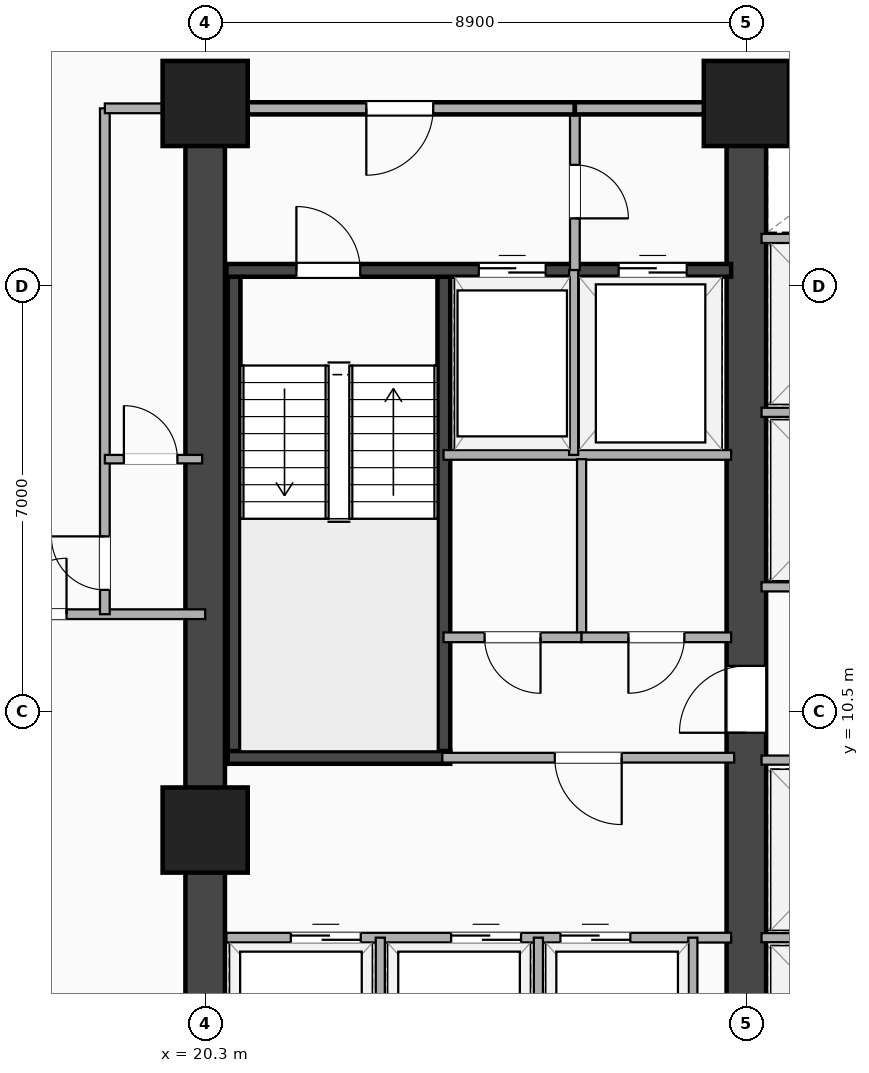
"""IFC4 building model, lengths in metres.
Left out: names, types, materials, properties, quantities, classifications, styles, units other than length and angle.
Written with IfcOpenShell. Run it as: python <this file> out.ifc"""

import sys

from ifc_helpers import new_model, si_unit, direction, frame, frame_2d, origin, origin_2d, place, context, subcontext, project, spatial, rectangle, extrude, element, fill, save


model = new_model("IFC4")
c1 = context("Model", 3, precision=1e-05, world=origin(), true_north=direction((0.0, 1.0)))
c2 = subcontext(c1, "Body", "Model", "MODEL_VIEW")
j1 = project(units=[si_unit("LENGTHUNIT", "METRE"), si_unit("PLANEANGLEUNIT", "RADIAN")], contexts=[c1])
p1 = place(None, origin())
s1 = spatial("IfcSite", under=j1, at=p1, CompositionType="ELEMENT")
p2 = place(p1, origin())
s2 = spatial("IfcBuilding", under=s1, at=p2, CompositionType="ELEMENT")
p3 = place(p2, frame((0.0, 0.0, 71.9)))
s3 = spatial("IfcBuildingStorey", under=s2, at=p3, CompositionType="ELEMENT", Elevation=71.9)
p4 = place(p3, frame((20.3, 3.5, 0.0), z_axis=(0.0, 0.0, 1.0), x_axis=(0.0, 1.0, 0.0)))
e1 = element("IfcWall", 1, at=p4, inside=s3, PredefinedType="SHEAR", context=c2, shape_type="SweptSolid", body=[
    extrude(rectangle(XDim=16.9, YDim=0.65, at=frame_2d((8.45, 0.0))), origin(), (0.0, 0.0, 1.0), 3.18),
])
p5 = place(p3, frame((29.2, 3.5, 0.0), z_axis=(0.0, 0.0, 1.0), x_axis=(0.0, 1.0, 0.0)))
e2 = element("IfcWall", 2, at=p5, inside=s3, PredefinedType="SHEAR", context=c2, shape_type="SweptSolid", body=[
    extrude(rectangle(XDim=16.9, YDim=0.65, at=frame_2d((8.45, 0.0))), origin(), (0.0, 0.0, 1.0), 3.18),
])
p6 = place(p5, frame((7.75, 0.0, 0.0), z_axis=(0.0, 0.0, 1.0), x_axis=(-1.0, 0.0, 0.0)))
e3 = element("IfcOpeningElement", 3, at=p6, cuts=e2, PredefinedType="OPENING", context=c2, shape_type="SweptSolid", body=[
    extrude(rectangle(XDim=1.1, YDim=2.15, at=frame_2d((0.55, 1.075))), frame((0.0, 0.335, 0.0), z_axis=(0.0, -1.0, 0.0), x_axis=(1.0, 0.0, 0.0)), (0.0, 0.0, 1.0), 0.67),
])
for number, where, z_axis, x_axis in (
    (4, (20.775, 9.745, 0.0), (0.0, 0.0, 1.0), (0.0, 1.0, 0.0)),
    (5, (24.225, 9.745, 0.0), (0.0, 0.0, 1.0), (0.0, 1.0, 0.0)),
):
    element("IfcWall", number, at=place(p3, frame(where, z_axis=z_axis, x_axis=x_axis)), inside=s3, PredefinedType="SHEAR", context=c2, shape_type="SweptSolid", body=[
        extrude(rectangle(XDim=8.01, YDim=0.21, at=frame_2d((4.005, 0.0))), origin(), (0.0, 0.0, 1.0), 3.18),
    ])
p7 = place(p3, frame((20.67, 9.745, 0.0), z_axis=(0.0, 0.0, 1.0), x_axis=(1.0, 0.0, 0.0)))
e6 = element("IfcWall", 6, at=p7, inside=s3, PredefinedType="SHEAR", context=c2, shape_type="SweptSolid", body=[
    extrude(rectangle(XDim=3.66, YDim=0.21, at=frame_2d((1.83, 0.0))), origin(), (0.0, 0.0, 1.0), 3.18),
])
p8 = place(p3, frame((20.65, 17.755, 0.0), z_axis=(0.0, 0.0, 1.0), x_axis=(1.0, 0.0, 0.0)))
e7 = element("IfcWall", 7, at=p8, inside=s3, PredefinedType="SHEAR", context=c2, shape_type="SweptSolid", body=[
    extrude(rectangle(XDim=8.3, YDim=0.21, at=frame_2d((4.15, 0.0))), origin(), (0.0, 0.0, 1.0), 3.18),
])
p9 = place(p8, frame((2.2, 0.0, 0.0), z_axis=(0.0, 0.0, 1.0), x_axis=(-1.0, 0.0, 0.0)))
e8 = element("IfcOpeningElement", 8, at=p9, cuts=e7, PredefinedType="OPENING", context=c2, shape_type="SweptSolid", body=[
    extrude(rectangle(XDim=1.05, YDim=2.15, at=frame_2d((0.525, 1.075))), frame((0.0, 0.115, 0.0), z_axis=(0.0, -1.0, 0.0), x_axis=(1.0, 0.0, 0.0)), (0.0, 0.0, 1.0), 0.23),
])
p10 = place(p8, frame((4.15, 0.0, 0.0)))
e9 = element("IfcOpeningElement", 9, at=p10, cuts=e7, PredefinedType="OPENING", context=c2, shape_type="SweptSolid", body=[
    extrude(rectangle(XDim=1.1, YDim=2.18, at=frame_2d((0.55, 1.09))), frame((0.0, 0.115, 0.0), z_axis=(0.0, -1.0, 0.0), x_axis=(1.0, 0.0, 0.0)), (0.0, 0.0, 1.0), 0.23),
])
p11 = place(p8, frame((6.45, 0.0, 0.0)))
e10 = element("IfcOpeningElement", 10, at=p11, cuts=e7, PredefinedType="OPENING", context=c2, shape_type="SweptSolid", body=[
    extrude(rectangle(XDim=1.12, YDim=2.2, at=frame_2d((0.56, 1.1))), frame((0.0, 0.115, 0.0), z_axis=(0.0, -1.0, 0.0), x_axis=(1.0, 0.0, 0.0)), (0.0, 0.0, 1.0), 0.23),
])
for number, where, z_axis, x_axis in (
    (11, (20.3, 8.55, -0.28), (0.0, 0.0, 1.0), (1.0, 0.0, 0.0)),
    (12, (20.3, 20.5, -0.28), (0.0, 0.0, 1.0), (1.0, 0.0, 0.0)),
    (13, (29.2, 20.5, -0.28), (0.0, 0.0, 1.0), (1.0, 0.0, 0.0)),
):
    element("IfcColumn", number, at=place(p3, frame(where, z_axis=z_axis, x_axis=x_axis)), inside=s3, PredefinedType="COLUMN", context=c2, shape_type="SweptSolid", body=[
        extrude(rectangle(XDim=1.4, YDim=1.4, at=origin_2d()), origin(), (0.0, 0.0, 1.0), 3.46),
    ])
p12 = place(p3, frame((26.38, 17.76, 0.0), z_axis=(0.0, 0.0, 1.0), x_axis=(0.0, 1.0, 0.0)))
e14 = element("IfcWall", 14, at=p12, inside=s3, PredefinedType="PARTITIONING", context=c2, shape_type="SweptSolid", body=[
    extrude(rectangle(XDim=2.66, YDim=0.16, at=frame_2d((1.33, 0.0))), origin(), (0.0, 0.0, 1.0), 2.47),
])
p13 = place(p12, frame((0.85, 0.0, 0.0)))
e15 = element("IfcOpeningElement", 15, at=p13, cuts=e14, PredefinedType="OPENING", context=c2, shape_type="SweptSolid", body=[
    extrude(rectangle(XDim=0.88, YDim=2.08, at=frame_2d((0.44, 1.04))), frame((0.0, 0.09, 0.0), z_axis=(0.0, -1.0, 0.0), x_axis=(1.0, 0.0, 0.0)), (0.0, 0.0, 1.0), 0.18),
])
p14 = place(p3, frame((24.22, 14.72, 0.0), z_axis=(0.0, 0.0, 1.0), x_axis=(1.0, 0.0, 0.0)))
e16 = element("IfcWall", 16, at=p14, inside=s3, PredefinedType="PARTITIONING", context=c2, shape_type="SweptSolid", body=[
    extrude(rectangle(XDim=4.73, YDim=0.16, at=frame_2d((2.365, 0.0))), origin(), (0.0, 0.0, 1.0), 3.18),
])
p15 = place(p3, frame((26.36, 14.72, 0.0), z_axis=(0.0, 0.0, 1.0), x_axis=(0.0, 1.0, 0.0)))
e17 = element("IfcWall", 17, at=p15, inside=s3, PredefinedType="PARTITIONING", context=c2, shape_type="SweptSolid", body=[
    extrude(rectangle(XDim=3.04, YDim=0.15, at=frame_2d((1.52, 0.0))), origin(), (0.0, 0.0, 1.0), 3.18),
])
p16 = place(p3, frame((20.65, 20.42, 0.0), z_axis=(0.0, 0.0, 1.0), x_axis=(1.0, 0.0, 0.0)))
e18 = element("IfcWall", 18, at=p16, inside=s3, PredefinedType="PARTITIONING", context=c2, shape_type="SweptSolid", body=[
    extrude(rectangle(XDim=5.73, YDim=0.2, at=frame_2d((2.865, 0.0))), origin(), (0.0, 0.0, 1.0), 2.47),
])
p17 = place(p16, frame((2.3, 0.0, 0.0)))
e19 = element("IfcOpeningElement", 19, at=p17, cuts=e18, PredefinedType="OPENING", context=c2, shape_type="SweptSolid", body=[
    extrude(rectangle(XDim=1.1, YDim=2.15, at=frame_2d((0.55, 1.075))), frame((0.0, 0.11, 0.0), z_axis=(0.0, -1.0, 0.0), x_axis=(1.0, 0.0, 0.0)), (0.0, 0.0, 1.0), 0.22),
])
p18 = place(p3, frame((26.38, 20.42, 0.0), z_axis=(0.0, 0.0, 1.0), x_axis=(1.0, 0.0, 0.0)))
e20 = element("IfcWall", 20, at=p18, inside=s3, PredefinedType="PARTITIONING", context=c2, shape_type="SweptSolid", body=[
    extrude(rectangle(XDim=2.82, YDim=0.2, at=frame_2d((1.41, 0.0))), origin(), (0.0, 0.0, 1.0), 2.47),
])
p19 = place(p3, frame((29.2, 20.42, 0.0), z_axis=(0.0, 0.0, 1.0), x_axis=(1.0, 0.0, 0.0)))
e21 = element("IfcWall", 21, at=p19, inside=s3, PredefinedType="PARTITIONING", context=c2, shape_type="SweptSolid", body=[
    extrude(rectangle(XDim=7.8, YDim=0.2, at=frame_2d((3.9, 0.0))), origin(), (0.0, 0.0, 1.0), 2.47),
])
p20 = place(p19, frame((3.55, 0.0, 0.0)))
e22 = element("IfcOpeningElement", 22, at=p20, cuts=e21, PredefinedType="OPENING", context=c2, shape_type="SweptSolid", body=[
    extrude(rectangle(XDim=1.1, YDim=2.15, at=frame_2d((0.55, 1.075))), frame((0.0, 0.11, 0.0), z_axis=(0.0, -1.0, 0.0), x_axis=(1.0, 0.0, 0.0)), (0.0, 0.0, 1.0), 0.22),
])
p21 = place(p3, frame((26.49, 11.72, 0.0), z_axis=(0.0, 0.0, 1.0), x_axis=(0.0, 1.0, 0.0)))
e23 = element("IfcWall", 23, at=p21, inside=s3, PredefinedType="PARTITIONING", context=c2, shape_type="SweptSolid", body=[
    extrude(rectangle(XDim=2.93, YDim=0.15, at=frame_2d((1.465, 0.0))), origin(), (0.0, 0.0, 1.0), 3.18),
])
p22 = place(p3, frame((24.22, 11.72, 0.0), z_axis=(0.0, 0.0, 1.0), x_axis=(1.0, 0.0, 0.0)))
e24 = element("IfcWall", 24, at=p22, inside=s3, PredefinedType="PARTITIONING", context=c2, shape_type="SweptSolid", body=[
    extrude(rectangle(XDim=2.271, YDim=0.16, at=frame_2d((1.135, 0.0))), origin(), (0.0, 0.0, 1.0), 3.18),
])
p23 = place(p22, frame((0.675, 0.0, 0.0)))
e25 = element("IfcOpeningElement", 25, at=p23, cuts=e24, PredefinedType="OPENING", context=c2, shape_type="SweptSolid", body=[
    extrude(rectangle(XDim=0.92, YDim=2.08, at=frame_2d((0.46, 1.04))), frame((0.0, 0.09, 0.0), z_axis=(0.0, -1.0, 0.0), x_axis=(1.0, 0.0, 0.0)), (0.0, 0.0, 1.0), 0.18),
])
p24 = place(p3, frame((26.49, 11.72, 0.0), z_axis=(0.0, 0.0, 1.0), x_axis=(1.0, 0.0, 0.0)))
e26 = element("IfcWall", 26, at=p24, inside=s3, PredefinedType="PARTITIONING", context=c2, shape_type="SweptSolid", body=[
    extrude(rectangle(XDim=2.459, YDim=0.16, at=frame_2d((1.23, 0.0))), origin(), (0.0, 0.0, 1.0), 3.18),
])
p25 = place(p24, frame((0.77, 0.0, 0.0)))
e27 = element("IfcOpeningElement", 27, at=p25, cuts=e26, PredefinedType="OPENING", context=c2, shape_type="SweptSolid", body=[
    extrude(rectangle(XDim=0.92, YDim=2.08, at=frame_2d((0.46, 1.04))), frame((0.0, 0.09, 0.0), z_axis=(0.0, -1.0, 0.0), x_axis=(1.0, 0.0, 0.0)), (0.0, 0.0, 1.0), 0.18),
])
p26 = place(p3, frame((20.65, 6.78, 0.0), z_axis=(0.0, 0.0, 1.0), x_axis=(1.0, 0.0, 0.0)))
e28 = element("IfcWall", 28, at=p26, inside=s3, PredefinedType="PARTITIONING", context=c2, shape_type="SweptSolid", body=[
    extrude(rectangle(XDim=8.3, YDim=0.16, at=frame_2d((4.15, 0.0))), origin(), (0.0, 0.0, 1.0), 2.47),
])
p27 = place(p26, frame((3.695, 0.0, 0.0)))
e29 = element("IfcOpeningElement", 29, at=p27, cuts=e28, PredefinedType="OPENING", context=c2, shape_type="SweptSolid", body=[
    extrude(rectangle(XDim=1.15, YDim=2.2, at=frame_2d((0.575, 1.1))), frame((0.0, 0.09, 0.0), z_axis=(0.0, -1.0, 0.0), x_axis=(1.0, 0.0, 0.0)), (0.0, 0.0, 1.0), 0.18),
])
p28 = place(p26, frame((5.492, 0.0, 0.0)))
e30 = element("IfcOpeningElement", 30, at=p28, cuts=e28, PredefinedType="OPENING", context=c2, shape_type="SweptSolid", body=[
    extrude(rectangle(XDim=1.15, YDim=2.2, at=frame_2d((0.575, 1.1))), frame((0.0, 0.09, 0.0), z_axis=(0.0, -1.0, 0.0), x_axis=(1.0, 0.0, 0.0)), (0.0, 0.0, 1.0), 0.18),
])
p29 = place(p26, frame((1.059, 0.0, 0.0)))
e31 = element("IfcOpeningElement", 31, at=p29, cuts=e28, PredefinedType="OPENING", context=c2, shape_type="SweptSolid", body=[
    extrude(rectangle(XDim=1.15, YDim=2.2, at=frame_2d((0.575, 1.1))), frame((0.0, 0.09, 0.0), z_axis=(0.0, -1.0, 0.0), x_axis=(1.0, 0.0, 0.0)), (0.0, 0.0, 1.0), 0.18),
])
for number, where, z_axis, x_axis in (
    (32, (23.18, 3.9, 0.0), (0.0, 0.0, 1.0), (0.0, 1.0, 0.0)),
    (33, (25.78, 3.9, 0.0), (0.0, 0.0, 1.0), (0.0, 1.0, 0.0)),
    (34, (28.32, 3.9, 0.0), (0.0, 0.0, 1.0), (0.0, 1.0, 0.0)),
):
    element("IfcWall", number, at=place(p3, frame(where, z_axis=z_axis, x_axis=x_axis)), inside=s3, PredefinedType="PARTITIONING", context=c2, shape_type="SweptSolid", body=[
        extrude(rectangle(XDim=2.88, YDim=0.15, at=frame_2d((1.44, 0.0))), origin(), (0.0, 0.0, 1.0), 3.18),
    ])
p30 = place(p3, frame((24.2, 9.74, 0.0), z_axis=(0.0, 0.0, 1.0), x_axis=(1.0, 0.0, 0.0)))
e35 = element("IfcWall", 35, at=p30, inside=s3, PredefinedType="PARTITIONING", context=c2, shape_type="SweptSolid", body=[
    extrude(rectangle(XDim=4.8, YDim=0.16, at=frame_2d((2.4, 0.0))), origin(), (0.0, 0.0, 1.0), 3.18),
])
p31 = place(p30, frame((1.85, 0.0, 0.0)))
e36 = element("IfcOpeningElement", 36, at=p31, cuts=e35, PredefinedType="OPENING", context=c2, shape_type="SweptSolid", body=[
    extrude(rectangle(XDim=1.1, YDim=2.15, at=frame_2d((0.55, 1.075))), frame((0.0, 0.09, 0.0), z_axis=(0.0, -1.0, 0.0), x_axis=(1.0, 0.0, 0.0)), (0.0, 0.0, 1.0), 0.18),
])
for number, where, z_axis, x_axis in (
    (37, (29.45, 6.78, 0.0), (0.0, 0.0, 1.0), (1.0, 0.0, 0.0)),
    (38, (29.45, 9.7, 0.0), (0.0, 0.0, 1.0), (1.0, 0.0, 0.0)),
    (39, (29.45, 12.55, 0.0), (0.0, 0.0, 1.0), (1.0, 0.0, 0.0)),
    (40, (29.45, 15.42, 0.0), (0.0, 0.0, 1.0), (1.0, 0.0, 0.0)),
    (41, (29.45, 18.28, 0.0), (0.0, 0.0, 1.0), (1.0, 0.0, 0.0)),
):
    element("IfcWall", number, at=place(p3, frame(where, z_axis=z_axis, x_axis=x_axis)), inside=s3, PredefinedType="PARTITIONING", context=c2, shape_type="SweptSolid", body=[
        extrude(rectangle(XDim=2.77, YDim=0.15, at=frame_2d((1.385, 0.0))), origin(), (0.0, 0.0, 1.0), 3.18),
    ])
p32 = place(p3, frame((16.65, 12.1, 0.0), z_axis=(0.0, 0.0, 1.0), x_axis=(1.0, 0.0, 0.0)))
e42 = element("IfcWall", 42, at=p32, inside=s3, PredefinedType="PARTITIONING", context=c2, shape_type="SweptSolid", body=[
    extrude(rectangle(XDim=3.65, YDim=0.16, at=frame_2d((1.825, 0.0))), origin(), (0.0, 0.0, 1.0), 2.47),
])
p33 = place(p32, frame((1.37, 0.0, 0.0), z_axis=(0.0, 0.0, 1.0), x_axis=(-1.0, 0.0, 0.0)))
e43 = element("IfcOpeningElement", 43, at=p33, cuts=e42, PredefinedType="OPENING", context=c2, shape_type="SweptSolid", body=[
    extrude(rectangle(XDim=0.92, YDim=2.08, at=frame_2d((0.46, 1.04))), frame((0.0, 0.09, 0.0), z_axis=(0.0, -1.0, 0.0), x_axis=(1.0, 0.0, 0.0)), (0.0, 0.0, 1.0), 0.18),
])
p34 = place(p3, frame((18.65, 12.1, 0.0), z_axis=(0.0, 0.0, 1.0), x_axis=(0.0, 1.0, 0.0)))
e44 = element("IfcWall", 44, at=p34, inside=s3, PredefinedType="PARTITIONING", context=c2, shape_type="SweptSolid", body=[
    extrude(rectangle(XDim=8.32, YDim=0.16, at=frame_2d((4.16, 0.0))), origin(), (0.0, 0.0, 1.0), 2.47),
])
p35 = place(p34, frame((1.28, 0.0, 0.0), z_axis=(0.0, 0.0, 1.0), x_axis=(-1.0, 0.0, 0.0)))
e45 = element("IfcOpeningElement", 45, at=p35, cuts=e44, PredefinedType="OPENING", context=c2, shape_type="SweptSolid", body=[
    extrude(rectangle(XDim=0.88, YDim=2.08, at=frame_2d((0.44, 1.04))), frame((0.0, 0.09, 0.0), z_axis=(0.0, -1.0, 0.0), x_axis=(1.0, 0.0, 0.0)), (0.0, 0.0, 1.0), 0.18),
])
p36 = place(p3, frame((18.65, 20.42, 0.0), z_axis=(0.0, 0.0, 1.0), x_axis=(1.0, 0.0, 0.0)))
e46 = element("IfcWall", 46, at=p36, inside=s3, PredefinedType="PARTITIONING", context=c2, shape_type="SweptSolid", body=[
    extrude(rectangle(XDim=1.65, YDim=0.16, at=frame_2d((0.825, 0.0))), origin(), (0.0, 0.0, 1.0), 2.47),
])
p37 = place(p3, frame((18.65, 14.65, 0.0), z_axis=(0.0, 0.0, 1.0), x_axis=(1.0, 0.0, 0.0)))
e47 = element("IfcWall", 47, at=p37, inside=s3, PredefinedType="PARTITIONING", context=c2, shape_type="SweptSolid", body=[
    extrude(rectangle(XDim=1.6, YDim=0.14, at=frame_2d((0.8, 0.0))), origin(), (0.0, 0.0, 1.0), 2.47),
])
p38 = place(p37, frame((1.193, 0.0, 0.0), z_axis=(0.0, 0.0, 1.0), x_axis=(-1.0, 0.0, 0.0)))
e48 = element("IfcOpeningElement", 48, at=p38, cuts=e47, PredefinedType="OPENING", context=c2, shape_type="SweptSolid", body=[
    extrude(rectangle(XDim=0.88, YDim=2.08, at=frame_2d((0.44, 1.04))), frame((0.0, 0.08, 0.0), z_axis=(0.0, -1.0, 0.0), x_axis=(1.0, 0.0, 0.0)), (0.0, 0.0, 1.0), 0.16),
])
p39 = place(p9, origin())
e49 = element("IfcDoor", 49, at=p39, inside=s3, OperationType="SINGLE_SWING_LEFT", PredefinedType="DOOR", context=c2, shape_type="SweptSolid", body=[
    extrude(rectangle(XDim=1.05, YDim=2.15, at=frame_2d((0.525, 1.075))), frame((0.0, 0.025, 0.0), z_axis=(0.0, -1.0, 0.0), x_axis=(1.0, 0.0, 0.0)), (0.0, 0.0, 1.0), 0.05),
])
fill(e8, e49)
p40 = place(p10, origin())
e50 = element("IfcDoor", 50, at=p40, inside=s3, OperationType="DOUBLE_DOOR_SLIDING", PredefinedType="DOOR", context=c2, shape_type="SweptSolid", body=[
    extrude(rectangle(XDim=1.1, YDim=2.18, at=frame_2d((0.55, 1.09))), frame((0.0, 0.025, 0.0), z_axis=(0.0, -1.0, 0.0), x_axis=(1.0, 0.0, 0.0)), (0.0, 0.0, 1.0), 0.05),
])
fill(e9, e50)
p41 = place(p11, origin())
e51 = element("IfcDoor", 51, at=p41, inside=s3, OperationType="DOUBLE_DOOR_SLIDING", PredefinedType="DOOR", context=c2, shape_type="SweptSolid", body=[
    extrude(rectangle(XDim=1.12, YDim=2.2, at=frame_2d((0.56, 1.1))), frame((0.0, 0.025, 0.0), z_axis=(0.0, -1.0, 0.0), x_axis=(1.0, 0.0, 0.0)), (0.0, 0.0, 1.0), 0.05),
])
fill(e10, e51)
p42 = place(p6, origin())
e52 = element("IfcDoor", 52, at=p42, inside=s3, OperationType="SINGLE_SWING_LEFT", PredefinedType="DOOR", context=c2, shape_type="SweptSolid", body=[
    extrude(rectangle(XDim=1.1, YDim=2.15, at=frame_2d((0.55, 1.075))), frame((0.0, 0.025, 0.0), z_axis=(0.0, -1.0, 0.0), x_axis=(1.0, 0.0, 0.0)), (0.0, 0.0, 1.0), 0.05),
])
fill(e3, e52)
p43 = place(p13, origin())
e53 = element("IfcDoor", 53, at=p43, inside=s3, OperationType="SINGLE_SWING_LEFT", PredefinedType="DOOR", context=c2, shape_type="SweptSolid", body=[
    extrude(rectangle(XDim=0.88, YDim=2.08, at=frame_2d((0.44, 1.04))), frame((0.0, 0.025, 0.0), z_axis=(0.0, -1.0, 0.0), x_axis=(1.0, 0.0, 0.0)), (0.0, 0.0, 1.0), 0.05),
])
fill(e15, e53)
p44 = place(p17, origin())
e54 = element("IfcDoor", 54, at=p44, inside=s3, OperationType="SINGLE_SWING_LEFT", PredefinedType="DOOR", context=c2, shape_type="SweptSolid", body=[
    extrude(rectangle(XDim=1.1, YDim=2.15, at=frame_2d((0.55, 1.075))), frame((0.0, 0.025, 0.0), z_axis=(0.0, -1.0, 0.0), x_axis=(1.0, 0.0, 0.0)), (0.0, 0.0, 1.0), 0.05),
])
fill(e19, e54)
p45 = place(p23, origin())
e55 = element("IfcDoor", 55, at=p45, inside=s3, OperationType="SINGLE_SWING_RIGHT", PredefinedType="DOOR", context=c2, shape_type="SweptSolid", body=[
    extrude(rectangle(XDim=0.92, YDim=2.08, at=frame_2d((0.46, 1.04))), frame((0.0, 0.025, 0.0), z_axis=(0.0, -1.0, 0.0), x_axis=(1.0, 0.0, 0.0)), (0.0, 0.0, 1.0), 0.05),
])
fill(e25, e55)
p46 = place(p25, origin())
e56 = element("IfcDoor", 56, at=p46, inside=s3, OperationType="SINGLE_SWING_LEFT", PredefinedType="DOOR", context=c2, shape_type="SweptSolid", body=[
    extrude(rectangle(XDim=0.92, YDim=2.08, at=frame_2d((0.46, 1.04))), frame((0.0, 0.025, 0.0), z_axis=(0.0, -1.0, 0.0), x_axis=(1.0, 0.0, 0.0)), (0.0, 0.0, 1.0), 0.05),
])
fill(e27, e56)
p47 = place(p27, origin())
e57 = element("IfcDoor", 57, at=p47, inside=s3, OperationType="DOUBLE_DOOR_SLIDING", PredefinedType="DOOR", context=c2, shape_type="SweptSolid", body=[
    extrude(rectangle(XDim=1.15, YDim=2.2, at=frame_2d((0.575, 1.1))), frame((0.0, 0.025, 0.0), z_axis=(0.0, -1.0, 0.0), x_axis=(1.0, 0.0, 0.0)), (0.0, 0.0, 1.0), 0.05),
])
fill(e29, e57)
p48 = place(p28, origin())
e58 = element("IfcDoor", 58, at=p48, inside=s3, OperationType="DOUBLE_DOOR_SLIDING", PredefinedType="DOOR", context=c2, shape_type="SweptSolid", body=[
    extrude(rectangle(XDim=1.15, YDim=2.2, at=frame_2d((0.575, 1.1))), frame((0.0, 0.025, 0.0), z_axis=(0.0, -1.0, 0.0), x_axis=(1.0, 0.0, 0.0)), (0.0, 0.0, 1.0), 0.05),
])
fill(e30, e58)
p49 = place(p29, origin())
e59 = element("IfcDoor", 59, at=p49, inside=s3, OperationType="DOUBLE_DOOR_SLIDING", PredefinedType="DOOR", context=c2, shape_type="SweptSolid", body=[
    extrude(rectangle(XDim=1.15, YDim=2.2, at=frame_2d((0.575, 1.1))), frame((0.0, 0.025, 0.0), z_axis=(0.0, -1.0, 0.0), x_axis=(1.0, 0.0, 0.0)), (0.0, 0.0, 1.0), 0.05),
])
fill(e31, e59)
p50 = place(p31, origin())
e60 = element("IfcDoor", 60, at=p50, inside=s3, OperationType="SINGLE_SWING_RIGHT", PredefinedType="DOOR", context=c2, shape_type="SweptSolid", body=[
    extrude(rectangle(XDim=1.1, YDim=2.15, at=frame_2d((0.55, 1.075))), frame((0.0, 0.025, 0.0), z_axis=(0.0, -1.0, 0.0), x_axis=(1.0, 0.0, 0.0)), (0.0, 0.0, 1.0), 0.05),
])
fill(e36, e60)
p51 = place(p33, origin())
e61 = element("IfcDoor", 61, at=p51, inside=s3, OperationType="SINGLE_SWING_RIGHT", PredefinedType="DOOR", context=c2, shape_type="SweptSolid", body=[
    extrude(rectangle(XDim=0.92, YDim=2.08, at=frame_2d((0.46, 1.04))), frame((0.0, 0.025, 0.0), z_axis=(0.0, -1.0, 0.0), x_axis=(1.0, 0.0, 0.0)), (0.0, 0.0, 1.0), 0.05),
])
fill(e43, e61)
p52 = place(p35, origin())
e62 = element("IfcDoor", 62, at=p52, inside=s3, OperationType="SINGLE_SWING_RIGHT", PredefinedType="DOOR", context=c2, shape_type="SweptSolid", body=[
    extrude(rectangle(XDim=0.88, YDim=2.08, at=frame_2d((0.44, 1.04))), frame((0.0, 0.025, 0.0), z_axis=(0.0, -1.0, 0.0), x_axis=(1.0, 0.0, 0.0)), (0.0, 0.0, 1.0), 0.05),
])
fill(e45, e62)
p53 = place(p38, origin())
e63 = element("IfcDoor", 63, at=p53, inside=s3, OperationType="SINGLE_SWING_LEFT", PredefinedType="DOOR", context=c2, shape_type="SweptSolid", body=[
    extrude(rectangle(XDim=0.88, YDim=2.08, at=frame_2d((0.44, 1.04))), frame((0.0, 0.025, 0.0), z_axis=(0.0, -1.0, 0.0), x_axis=(1.0, 0.0, 0.0)), (0.0, 0.0, 1.0), 0.05),
])
fill(e48, e63)
save(model, sys.argv[1])
